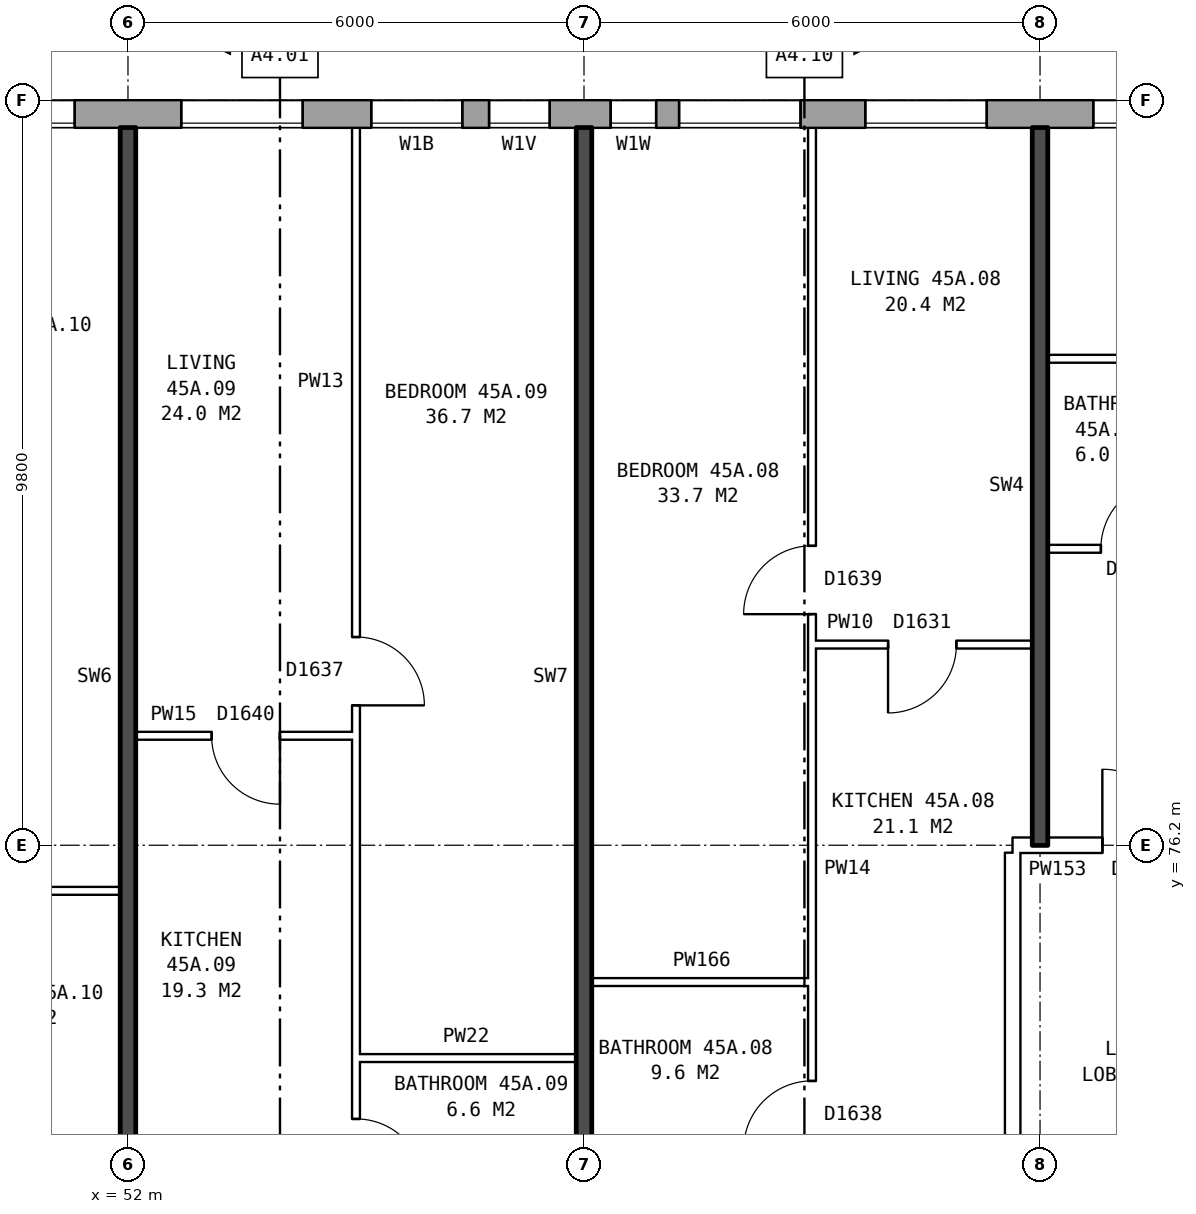
"""IFC4 building model, lengths in metres.
Left out: names, types, materials, properties, quantities, classifications, styles, units other than length and angle.
Written with IfcOpenShell. Run it as: python <this file> out.ifc"""

import sys

from ifc_helpers import new_model, si_unit, direction, frame, frame_2d, origin, place, context, subcontext, project, spatial, rectangle, extrude, element, fill, save


model = new_model("IFC4")
c1 = context("Model", 3, precision=1e-05, world=origin(), true_north=direction((0.0, 1.0)))
c2 = subcontext(c1, "Body", "Model", "MODEL_VIEW")
j1 = project(units=[si_unit("LENGTHUNIT", "METRE"), si_unit("PLANEANGLEUNIT", "RADIAN")], contexts=[c1])
p1 = place(None, origin())
s1 = spatial("IfcSite", under=j1, at=p1, CompositionType="ELEMENT")
p2 = place(p1, origin())
s2 = spatial("IfcBuilding", under=s1, at=p2, CompositionType="ELEMENT")
p3 = place(p2, frame((0.0, 0.0, 160.9)))
s3 = spatial("IfcBuildingStorey", under=s2, at=p3, CompositionType="ELEMENT", Elevation=160.9)
p4 = place(p3, frame((72.925, 85.82, 0.0), z_axis=(0.0, 0.0, 1.0), x_axis=(-1.0, 0.0, 0.0)))
e1 = element("IfcWall", 1, at=p4, inside=s3, PredefinedType="STANDARD", context=c2, shape_type="SweptSolid", body=[
    extrude(rectangle(XDim=41.351, YDim=0.36, at=frame_2d((20.675, 0.0))), origin(), (0.0, 0.0, 1.0), 2.85),
])
p5 = place(p4, frame((0.625, 0.0, 0.8)))
e2 = element("IfcOpeningElement", 2, at=p5, cuts=e1, PredefinedType="OPENING", context=c2, shape_type="SweptSolid", body=[
    extrude(rectangle(XDim=1.6, YDim=1.8, at=frame_2d((0.8, 0.9))), frame((0.0, 0.19, 0.0), z_axis=(0.0, -1.0, 0.0), x_axis=(1.0, 0.0, 0.0)), (0.0, 0.0, 1.0), 0.38),
])
p6 = place(p4, frame((3.625, 0.0, 0.8)))
e3 = element("IfcOpeningElement", 3, at=p6, cuts=e1, PredefinedType="OPENING", context=c2, shape_type="SweptSolid", body=[
    extrude(rectangle(XDim=1.6, YDim=1.8, at=frame_2d((0.8, 0.9))), frame((0.0, 0.19, 0.0), z_axis=(0.0, -1.0, 0.0), x_axis=(1.0, 0.0, 0.0)), (0.0, 0.0, 1.0), 0.38),
])
p7 = place(p4, frame((6.625, 0.0, 0.8)))
e4 = element("IfcOpeningElement", 4, at=p7, cuts=e1, PredefinedType="OPENING", context=c2, shape_type="SweptSolid", body=[
    extrude(rectangle(XDim=1.6, YDim=1.8, at=frame_2d((0.8, 0.9))), frame((0.0, 0.19, 0.0), z_axis=(0.0, -1.0, 0.0), x_axis=(1.0, 0.0, 0.0)), (0.0, 0.0, 1.0), 0.38),
])
p8 = place(p4, frame((9.625, 0.0, 0.8)))
e5 = element("IfcOpeningElement", 5, at=p8, cuts=e1, PredefinedType="OPENING", context=c2, shape_type="SweptSolid", body=[
    extrude(rectangle(XDim=1.6, YDim=1.8, at=frame_2d((0.8, 0.9))), frame((0.0, 0.19, 0.0), z_axis=(0.0, -1.0, 0.0), x_axis=(1.0, 0.0, 0.0)), (0.0, 0.0, 1.0), 0.38),
])
p9 = place(p4, frame((12.075, 0.0, 0.8)))
e6 = element("IfcOpeningElement", 6, at=p9, cuts=e1, PredefinedType="OPENING", context=c2, shape_type="SweptSolid", body=[
    extrude(rectangle(XDim=1.6, YDim=1.8, at=frame_2d((0.8, 0.9))), frame((0.0, 0.19, 0.0), z_axis=(0.0, -1.0, 0.0), x_axis=(1.0, 0.0, 0.0)), (0.0, 0.0, 1.0), 0.38),
])
p10 = place(p4, frame((15.375, 0.0, 0.25)))
e7 = element("IfcOpeningElement", 7, at=p10, cuts=e1, PredefinedType="OPENING", context=c2, shape_type="SweptSolid", body=[
    extrude(rectangle(XDim=0.8, YDim=0.9, at=frame_2d((0.4, 0.45))), frame((0.0, 0.19, 0.0), z_axis=(0.0, -1.0, 0.0), x_axis=(1.0, 0.0, 0.0)), (0.0, 0.0, 1.0), 0.38),
])
p11 = place(p4, frame((18.625, 0.0, 0.8)))
e8 = element("IfcOpeningElement", 8, at=p11, cuts=e1, PredefinedType="OPENING", context=c2, shape_type="SweptSolid", body=[
    extrude(rectangle(XDim=1.6, YDim=1.8, at=frame_2d((0.8, 0.9))), frame((0.0, 0.19, 0.0), z_axis=(0.0, -1.0, 0.0), x_axis=(1.0, 0.0, 0.0)), (0.0, 0.0, 1.0), 0.38),
])
p12 = place(p4, frame((21.625, 0.0, 0.8)))
e9 = element("IfcOpeningElement", 9, at=p12, cuts=e1, PredefinedType="OPENING", context=c2, shape_type="SweptSolid", body=[
    extrude(rectangle(XDim=1.6, YDim=1.8, at=frame_2d((0.8, 0.9))), frame((0.0, 0.19, 0.0), z_axis=(0.0, -1.0, 0.0), x_axis=(1.0, 0.0, 0.0)), (0.0, 0.0, 1.0), 0.38),
])
p13 = place(p4, frame((24.075, 0.0, 0.35)))
e10 = element("IfcOpeningElement", 10, at=p13, cuts=e1, PredefinedType="OPENING", context=c2, shape_type="SweptSolid", body=[
    extrude(rectangle(XDim=1.0, YDim=1.5, at=frame_2d((0.5, 0.75))), frame((0.0, 0.19, 0.0), z_axis=(0.0, -1.0, 0.0), x_axis=(1.0, 0.0, 0.0)), (0.0, 0.0, 1.0), 0.38),
])
p14 = place(p4, frame((27.625, 0.0, 0.8)))
e11 = element("IfcOpeningElement", 11, at=p14, cuts=e1, PredefinedType="OPENING", context=c2, shape_type="SweptSolid", body=[
    extrude(rectangle(XDim=1.6, YDim=1.8, at=frame_2d((0.8, 0.9))), frame((0.0, 0.19, 0.0), z_axis=(0.0, -1.0, 0.0), x_axis=(1.0, 0.0, 0.0)), (0.0, 0.0, 1.0), 0.38),
])
p15 = place(p4, frame((30.625, 0.0, 0.8)))
e12 = element("IfcOpeningElement", 12, at=p15, cuts=e1, PredefinedType="OPENING", context=c2, shape_type="SweptSolid", body=[
    extrude(rectangle(XDim=1.6, YDim=1.8, at=frame_2d((0.8, 0.9))), frame((0.0, 0.19, 0.0), z_axis=(0.0, -1.0, 0.0), x_axis=(1.0, 0.0, 0.0)), (0.0, 0.0, 1.0), 0.38),
])
p16 = place(p4, frame((33.625, 0.0, 0.8)))
e13 = element("IfcOpeningElement", 13, at=p16, cuts=e1, PredefinedType="OPENING", context=c2, shape_type="SweptSolid", body=[
    extrude(rectangle(XDim=1.6, YDim=1.8, at=frame_2d((0.8, 0.9))), frame((0.0, 0.19, 0.0), z_axis=(0.0, -1.0, 0.0), x_axis=(1.0, 0.0, 0.0)), (0.0, 0.0, 1.0), 0.38),
])
p17 = place(p4, frame((36.625, 0.0, 0.8)))
e14 = element("IfcOpeningElement", 14, at=p17, cuts=e1, PredefinedType="OPENING", context=c2, shape_type="SweptSolid", body=[
    extrude(rectangle(XDim=1.6, YDim=1.8, at=frame_2d((0.8, 0.9))), frame((0.0, 0.19, 0.0), z_axis=(0.0, -1.0, 0.0), x_axis=(1.0, 0.0, 0.0)), (0.0, 0.0, 1.0), 0.38),
])
p18 = place(p4, frame((13.975, 0.0, 1.5)))
e15 = element("IfcOpeningElement", 15, at=p18, cuts=e1, PredefinedType="OPENING", context=c2, shape_type="SweptSolid", body=[
    extrude(rectangle(XDim=0.6, YDim=0.9, at=frame_2d((0.3, 0.45))), frame((0.0, 0.19, 0.0), z_axis=(0.0, -1.0, 0.0), x_axis=(1.0, 0.0, 0.0)), (0.0, 0.0, 1.0), 0.38),
])
p19 = place(p4, frame((16.525, 0.0, 0.25)))
e16 = element("IfcOpeningElement", 16, at=p19, cuts=e1, PredefinedType="OPENING", context=c2, shape_type="SweptSolid", body=[
    extrude(rectangle(XDim=1.2, YDim=1.8, at=frame_2d((0.6, 0.9))), frame((0.0, 0.19, 0.0), z_axis=(0.0, -1.0, 0.0), x_axis=(1.0, 0.0, 0.0)), (0.0, 0.0, 1.0), 0.38),
])
p20 = place(p4, frame((25.375, 0.0, 0.25)))
e17 = element("IfcOpeningElement", 17, at=p20, cuts=e1, PredefinedType="OPENING", context=c2, shape_type="SweptSolid", body=[
    extrude(rectangle(XDim=0.6, YDim=0.9, at=frame_2d((0.3, 0.45))), frame((0.0, 0.19, 0.0), z_axis=(0.0, -1.0, 0.0), x_axis=(1.0, 0.0, 0.0)), (0.0, 0.0, 1.0), 0.38),
])
p21 = place(p3, frame((63.64, 63.9, 0.0), z_axis=(0.0, 0.0, 1.0), x_axis=(0.0, 1.0, 0.0)))
e18 = element("IfcWall", 18, at=p21, inside=s3, PredefinedType="PARTITIONING", context=c2, shape_type="SweptSolid", body=[
    extrude(rectangle(XDim=12.2, YDim=0.2, at=frame_2d((6.1, 0.0))), origin(), (0.0, 0.0, 1.0), 2.85),
])
p22 = place(p21, frame((5.1, 0.0, 0.0)))
e19 = element("IfcOpeningElement", 19, at=p22, cuts=e18, PredefinedType="OPENING", context=c2, shape_type="SweptSolid", body=[
    extrude(rectangle(XDim=2.0, YDim=2.1, at=frame_2d((1.0, 1.05))), frame((0.0, 0.11, 0.0), z_axis=(0.0, -1.0, 0.0), x_axis=(1.0, 0.0, 0.0)), (0.0, 0.0, 1.0), 0.22),
])
for number, where, z_axis, x_axis in (
    (20, (55.0, 73.4, 0.0), (0.0, 0.0, 1.0), (1.0, 0.0, 0.0)),
    (21, (58.1, 74.4, 0.0), (0.0, 0.0, 1.0), (1.0, 0.0, 0.0)),
    (22, (49.0, 75.6, 0.0), (0.0, 0.0, 1.0), (1.0, 0.0, 0.0)),
):
    element("IfcWall", number, at=place(p3, frame(where, z_axis=z_axis, x_axis=x_axis)), inside=s3, PredefinedType="PARTITIONING", context=c2, shape_type="SweptSolid", body=[
        extrude(rectangle(XDim=2.9, YDim=0.1, at=frame_2d((1.45, 0.0))), origin(), (0.0, 0.0, 1.0), 2.85),
    ])
p23 = place(p3, frame((63.64, 76.2, 0.0), z_axis=(0.0, 0.0, 1.0), x_axis=(1.0, 0.0, 0.0)))
e23 = element("IfcWall", 23, at=p23, inside=s3, PredefinedType="PARTITIONING", context=c2, shape_type="SweptSolid", body=[
    extrude(rectangle(XDim=3.0, YDim=0.2, at=frame_2d((1.5, 0.0))), origin(), (0.0, 0.0, 1.0), 2.85),
])
p24 = place(p23, frame((1.18, 0.0, 0.0)))
e24 = element("IfcOpeningElement", 24, at=p24, cuts=e23, PredefinedType="OPENING", context=c2, shape_type="SweptSolid", body=[
    extrude(rectangle(XDim=1.0, YDim=2.1, at=frame_2d((0.5, 1.05))), frame((0.0, 0.11, 0.0), z_axis=(0.0, -1.0, 0.0), x_axis=(1.0, 0.0, 0.0)), (0.0, 0.0, 1.0), 0.22),
])
p25 = place(p3, frame((52.1, 77.64, 0.0), z_axis=(0.0, 0.0, 1.0), x_axis=(1.0, 0.0, 0.0)))
e25 = element("IfcWall", 25, at=p25, inside=s3, PredefinedType="PARTITIONING", context=c2, shape_type="SweptSolid", body=[
    extrude(rectangle(XDim=2.9, YDim=0.1, at=frame_2d((1.45, 0.0))), origin(), (0.0, 0.0, 1.0), 2.85),
])
p26 = place(p25, frame((1.0, 0.0, 0.0)))
e26 = element("IfcOpeningElement", 26, at=p26, cuts=e25, PredefinedType="OPENING", context=c2, shape_type="SweptSolid", body=[
    extrude(rectangle(XDim=0.9, YDim=2.1, at=frame_2d((0.45, 1.05))), frame((0.0, 0.06, 0.0), z_axis=(0.0, -1.0, 0.0), x_axis=(1.0, 0.0, 0.0)), (0.0, 0.0, 1.0), 0.12),
])
p27 = place(p3, frame((61.0, 78.84, 0.0), z_axis=(0.0, 0.0, 1.0), x_axis=(1.0, 0.0, 0.0)))
e27 = element("IfcWall", 27, at=p27, inside=s3, PredefinedType="PARTITIONING", context=c2, shape_type="SweptSolid", body=[
    extrude(rectangle(XDim=2.9, YDim=0.1, at=frame_2d((1.45, 0.0))), origin(), (0.0, 0.0, 1.0), 2.85),
])
p28 = place(p27, frame((1.0, 0.0, 0.0)))
e28 = element("IfcOpeningElement", 28, at=p28, cuts=e27, PredefinedType="OPENING", context=c2, shape_type="SweptSolid", body=[
    extrude(rectangle(XDim=0.9, YDim=2.1, at=frame_2d((0.45, 1.05))), frame((0.0, 0.06, 0.0), z_axis=(0.0, -1.0, 0.0), x_axis=(1.0, 0.0, 0.0)), (0.0, 0.0, 1.0), 0.12),
])
p29 = place(p3, frame((64.1, 80.1, 0.0), z_axis=(0.0, 0.0, 1.0), x_axis=(1.0, 0.0, 0.0)))
e29 = element("IfcWall", 29, at=p29, inside=s3, PredefinedType="PARTITIONING", context=c2, shape_type="SweptSolid", body=[
    extrude(rectangle(XDim=5.8, YDim=0.1, at=frame_2d((2.9, 0.0))), origin(), (0.0, 0.0, 1.0), 2.85),
])
p30 = place(p29, frame((3.6, 0.0, 0.0)))
e30 = element("IfcOpeningElement", 30, at=p30, cuts=e29, PredefinedType="OPENING", context=c2, shape_type="SweptSolid", body=[
    extrude(rectangle(XDim=0.9, YDim=2.1, at=frame_2d((0.45, 1.05))), frame((0.0, 0.06, 0.0), z_axis=(0.0, -1.0, 0.0), x_axis=(1.0, 0.0, 0.0)), (0.0, 0.0, 1.0), 0.12),
])
p31 = place(p29, frame((0.7, 0.0, 0.0)))
e31 = element("IfcOpeningElement", 31, at=p31, cuts=e29, PredefinedType="OPENING", context=c2, shape_type="SweptSolid", body=[
    extrude(rectangle(XDim=0.9, YDim=2.1, at=frame_2d((0.45, 1.05))), frame((0.0, 0.06, 0.0), z_axis=(0.0, -1.0, 0.0), x_axis=(1.0, 0.0, 0.0)), (0.0, 0.0, 1.0), 0.12),
])
p32 = place(p3, frame((64.1, 82.6, 0.0), z_axis=(0.0, 0.0, 1.0), x_axis=(1.0, 0.0, 0.0)))
e32 = element("IfcWall", 32, at=p32, inside=s3, PredefinedType="PARTITIONING", context=c2, shape_type="SweptSolid", body=[
    extrude(rectangle(XDim=2.3, YDim=0.1, at=frame_2d((1.15, 0.0))), origin(), (0.0, 0.0, 1.0), 2.85),
])
p33 = place(p3, frame((52.0, 71.2, 0.0), z_axis=(0.0, 0.0, 1.0), x_axis=(0.0, 1.0, 0.0)))
e33 = element("IfcWall", 33, at=p33, inside=s3, PredefinedType="SOLIDWALL", context=c2, shape_type="SweptSolid", body=[
    extrude(rectangle(XDim=14.44, YDim=0.2, at=frame_2d((7.22, 0.0))), origin(), (0.0, 0.0, 1.0), 2.85),
])
p34 = place(p3, frame((55.0, 71.3, 0.0), z_axis=(0.0, 0.0, 1.0), x_axis=(0.0, 1.0, 0.0)))
e34 = element("IfcWall", 34, at=p34, inside=s3, PredefinedType="PARTITIONING", context=c2, shape_type="SweptSolid", body=[
    extrude(rectangle(XDim=14.34, YDim=0.1, at=frame_2d((7.17, 0.0))), origin(), (0.0, 0.0, 1.0), 2.85),
])
p35 = place(p34, frame((6.74, 0.0, 0.0)))
e35 = element("IfcOpeningElement", 35, at=p35, cuts=e34, PredefinedType="OPENING", context=c2, shape_type="SweptSolid", body=[
    extrude(rectangle(XDim=0.9, YDim=2.1, at=frame_2d((0.45, 1.05))), frame((0.0, 0.06, 0.0), z_axis=(0.0, -1.0, 0.0), x_axis=(1.0, 0.0, 0.0)), (0.0, 0.0, 1.0), 0.12),
])
p36 = place(p34, frame((0.4, 0.0, 0.0)))
e36 = element("IfcOpeningElement", 36, at=p36, cuts=e34, PredefinedType="OPENING", context=c2, shape_type="SweptSolid", body=[
    extrude(rectangle(XDim=0.9, YDim=2.1, at=frame_2d((0.45, 1.05))), frame((0.0, 0.06, 0.0), z_axis=(0.0, -1.0, 0.0), x_axis=(1.0, 0.0, 0.0)), (0.0, 0.0, 1.0), 0.12),
])
p37 = place(p3, frame((58.0, 71.2, 0.0), z_axis=(0.0, 0.0, 1.0), x_axis=(0.0, 1.0, 0.0)))
e37 = element("IfcWall", 37, at=p37, inside=s3, PredefinedType="SOLIDWALL", context=c2, shape_type="SweptSolid", body=[
    extrude(rectangle(XDim=14.44, YDim=0.2, at=frame_2d((7.22, 0.0))), origin(), (0.0, 0.0, 1.0), 2.85),
])
p38 = place(p3, frame((61.0, 71.3, 0.0), z_axis=(0.0, 0.0, 1.0), x_axis=(0.0, 1.0, 0.0)))
e38 = element("IfcWall", 38, at=p38, inside=s3, PredefinedType="PARTITIONING", context=c2, shape_type="SweptSolid", body=[
    extrude(rectangle(XDim=14.34, YDim=0.1, at=frame_2d((7.17, 0.0))), origin(), (0.0, 0.0, 1.0), 2.85),
])
p39 = place(p38, frame((7.94, 0.0, 0.0)))
e39 = element("IfcOpeningElement", 39, at=p39, cuts=e38, PredefinedType="OPENING", context=c2, shape_type="SweptSolid", body=[
    extrude(rectangle(XDim=0.9, YDim=2.1, at=frame_2d((0.45, 1.05))), frame((0.0, 0.06, 0.0), z_axis=(0.0, -1.0, 0.0), x_axis=(1.0, 0.0, 0.0)), (0.0, 0.0, 1.0), 0.12),
])
p40 = place(p38, frame((0.9, 0.0, 0.0)))
e40 = element("IfcOpeningElement", 40, at=p40, cuts=e38, PredefinedType="OPENING", context=c2, shape_type="SweptSolid", body=[
    extrude(rectangle(XDim=0.9, YDim=2.1, at=frame_2d((0.45, 1.05))), frame((0.0, 0.06, 0.0), z_axis=(0.0, -1.0, 0.0), x_axis=(1.0, 0.0, 0.0)), (0.0, 0.0, 1.0), 0.12),
])
p41 = place(p3, frame((64.0, 76.2, 0.0), z_axis=(0.0, 0.0, 1.0), x_axis=(0.0, 1.0, 0.0)))
e41 = element("IfcWall", 41, at=p41, inside=s3, PredefinedType="SOLIDWALL", context=c2, shape_type="SweptSolid", body=[
    extrude(rectangle(XDim=9.44, YDim=0.2, at=frame_2d((4.72, 0.0))), origin(), (0.0, 0.0, 1.0), 2.85),
])
p42 = place(p7, origin())
e42 = element("IfcWindow", 42, at=p42, inside=s3, PartitioningType="SINGLE_PANEL", PredefinedType="WINDOW", context=c2, shape_type="SweptSolid", body=[
    extrude(rectangle(XDim=1.6, YDim=1.8, at=frame_2d((0.8, 0.9))), frame((0.0, 0.15, 0.0), z_axis=(0.0, -1.0, 0.0), x_axis=(1.0, 0.0, 0.0)), (0.0, 0.0, 1.0), 0.06),
])
fill(e4, e42)
p43 = place(p8, origin())
e43 = element("IfcWindow", 43, at=p43, inside=s3, PartitioningType="SINGLE_PANEL", PredefinedType="WINDOW", context=c2, shape_type="SweptSolid", body=[
    extrude(rectangle(XDim=1.6, YDim=1.8, at=frame_2d((0.8, 0.9))), frame((0.0, 0.15, 0.0), z_axis=(0.0, -1.0, 0.0), x_axis=(1.0, 0.0, 0.0)), (0.0, 0.0, 1.0), 0.06),
])
fill(e5, e43)
p44 = place(p9, origin())
e44 = element("IfcWindow", 44, at=p44, inside=s3, PartitioningType="SINGLE_PANEL", PredefinedType="WINDOW", context=c2, shape_type="SweptSolid", body=[
    extrude(rectangle(XDim=1.6, YDim=1.8, at=frame_2d((0.8, 0.9))), frame((0.0, 0.15, 0.0), z_axis=(0.0, -1.0, 0.0), x_axis=(1.0, 0.0, 0.0)), (0.0, 0.0, 1.0), 0.06),
])
fill(e6, e44)
p45 = place(p10, origin())
e45 = element("IfcWindow", 45, at=p45, inside=s3, PartitioningType="SINGLE_PANEL", PredefinedType="WINDOW", context=c2, shape_type="SweptSolid", body=[
    extrude(rectangle(XDim=0.8, YDim=0.9, at=frame_2d((0.4, 0.45))), frame((0.0, 0.15, 0.0), z_axis=(0.0, -1.0, 0.0), x_axis=(1.0, 0.0, 0.0)), (0.0, 0.0, 1.0), 0.06),
])
fill(e7, e45)
p46 = place(p11, origin())
e46 = element("IfcWindow", 46, at=p46, inside=s3, PartitioningType="SINGLE_PANEL", PredefinedType="WINDOW", context=c2, shape_type="SweptSolid", body=[
    extrude(rectangle(XDim=1.6, YDim=1.8, at=frame_2d((0.8, 0.9))), frame((0.0, 0.15, 0.0), z_axis=(0.0, -1.0, 0.0), x_axis=(1.0, 0.0, 0.0)), (0.0, 0.0, 1.0), 0.06),
])
fill(e8, e46)
p47 = place(p12, origin())
e47 = element("IfcWindow", 47, at=p47, inside=s3, PartitioningType="SINGLE_PANEL", PredefinedType="WINDOW", context=c2, shape_type="SweptSolid", body=[
    extrude(rectangle(XDim=1.6, YDim=1.8, at=frame_2d((0.8, 0.9))), frame((0.0, 0.15, 0.0), z_axis=(0.0, -1.0, 0.0), x_axis=(1.0, 0.0, 0.0)), (0.0, 0.0, 1.0), 0.06),
])
fill(e9, e47)
p48 = place(p24, origin())
e48 = element("IfcDoor", 48, at=p48, inside=s3, OperationType="SINGLE_SWING_LEFT", PredefinedType="DOOR", context=c2, shape_type="SweptSolid", body=[
    extrude(rectangle(XDim=1.0, YDim=2.1, at=frame_2d((0.5, 1.05))), frame((0.0, 0.025, 0.0), z_axis=(0.0, -1.0, 0.0), x_axis=(1.0, 0.0, 0.0)), (0.0, 0.0, 1.0), 0.05),
])
fill(e24, e48)
p49 = place(p31, origin())
e49 = element("IfcDoor", 49, at=p49, inside=s3, OperationType="SINGLE_SWING_RIGHT", PredefinedType="DOOR", context=c2, shape_type="SweptSolid", body=[
    extrude(rectangle(XDim=0.9, YDim=2.1, at=frame_2d((0.45, 1.05))), frame((0.0, 0.025, 0.0), z_axis=(0.0, -1.0, 0.0), x_axis=(1.0, 0.0, 0.0)), (0.0, 0.0, 1.0), 0.05),
])
fill(e31, e49)
p50 = place(p39, origin())
e50 = element("IfcDoor", 50, at=p50, inside=s3, OperationType="SINGLE_SWING_LEFT", PredefinedType="DOOR", context=c2, shape_type="SweptSolid", body=[
    extrude(rectangle(XDim=0.9, YDim=2.1, at=frame_2d((0.45, 1.05))), frame((0.0, 0.025, 0.0), z_axis=(0.0, -1.0, 0.0), x_axis=(1.0, 0.0, 0.0)), (0.0, 0.0, 1.0), 0.05),
])
fill(e39, e50)
p51 = place(p28, frame((0.9, 0.0, 0.0), z_axis=(0.0, 0.0, 1.0), x_axis=(-1.0, 0.0, 0.0)))
e51 = element("IfcDoor", 51, at=p51, inside=s3, OperationType="SINGLE_SWING_RIGHT", PredefinedType="DOOR", context=c2, shape_type="SweptSolid", body=[
    extrude(rectangle(XDim=0.9, YDim=2.1, at=frame_2d((0.45, 1.05))), frame((0.0, 0.025, 0.0), z_axis=(0.0, -1.0, 0.0), x_axis=(1.0, 0.0, 0.0)), (0.0, 0.0, 1.0), 0.05),
])
fill(e28, e51)
p52 = place(p40, origin())
e52 = element("IfcDoor", 52, at=p52, inside=s3, OperationType="SINGLE_SWING_LEFT", PredefinedType="DOOR", context=c2, shape_type="SweptSolid", body=[
    extrude(rectangle(XDim=0.9, YDim=2.1, at=frame_2d((0.45, 1.05))), frame((0.0, 0.025, 0.0), z_axis=(0.0, -1.0, 0.0), x_axis=(1.0, 0.0, 0.0)), (0.0, 0.0, 1.0), 0.05),
])
fill(e40, e52)
p53 = place(p35, frame((0.9, 0.0, 0.0), z_axis=(0.0, 0.0, 1.0), x_axis=(-1.0, 0.0, 0.0)))
e53 = element("IfcDoor", 53, at=p53, inside=s3, OperationType="SINGLE_SWING_RIGHT", PredefinedType="DOOR", context=c2, shape_type="SweptSolid", body=[
    extrude(rectangle(XDim=0.9, YDim=2.1, at=frame_2d((0.45, 1.05))), frame((0.0, 0.025, 0.0), z_axis=(0.0, -1.0, 0.0), x_axis=(1.0, 0.0, 0.0)), (0.0, 0.0, 1.0), 0.05),
])
fill(e35, e53)
p54 = place(p26, frame((0.9, 0.0, 0.0), z_axis=(0.0, 0.0, 1.0), x_axis=(-1.0, 0.0, 0.0)))
e54 = element("IfcDoor", 54, at=p54, inside=s3, OperationType="SINGLE_SWING_LEFT", PredefinedType="DOOR", context=c2, shape_type="SweptSolid", body=[
    extrude(rectangle(XDim=0.9, YDim=2.1, at=frame_2d((0.45, 1.05))), frame((0.0, 0.025, 0.0), z_axis=(0.0, -1.0, 0.0), x_axis=(1.0, 0.0, 0.0)), (0.0, 0.0, 1.0), 0.05),
])
fill(e26, e54)
p55 = place(p36, frame((0.9, 0.0, 0.0), z_axis=(0.0, 0.0, 1.0), x_axis=(-1.0, 0.0, 0.0)))
e55 = element("IfcDoor", 55, at=p55, inside=s3, OperationType="SINGLE_SWING_RIGHT", PredefinedType="DOOR", context=c2, shape_type="SweptSolid", body=[
    extrude(rectangle(XDim=0.9, YDim=2.1, at=frame_2d((0.45, 1.05))), frame((0.0, 0.025, 0.0), z_axis=(0.0, -1.0, 0.0), x_axis=(1.0, 0.0, 0.0)), (0.0, 0.0, 1.0), 0.05),
])
fill(e36, e55)
p56 = place(p18, origin())
e56 = element("IfcWindow", 56, at=p56, inside=s3, PartitioningType="SINGLE_PANEL", PredefinedType="WINDOW", context=c2, shape_type="SweptSolid", body=[
    extrude(rectangle(XDim=0.6, YDim=0.9, at=frame_2d((0.3, 0.45))), frame((0.0, 0.15, 0.0), z_axis=(0.0, -1.0, 0.0), x_axis=(1.0, 0.0, 0.0)), (0.0, 0.0, 1.0), 0.06),
])
fill(e15, e56)
p57 = place(p19, origin())
e57 = element("IfcWindow", 57, at=p57, inside=s3, PartitioningType="SINGLE_PANEL", PredefinedType="WINDOW", context=c2, shape_type="SweptSolid", body=[
    extrude(rectangle(XDim=1.2, YDim=1.8, at=frame_2d((0.6, 0.9))), frame((0.0, 0.15, 0.0), z_axis=(0.0, -1.0, 0.0), x_axis=(1.0, 0.0, 0.0)), (0.0, 0.0, 1.0), 0.06),
])
fill(e16, e57)
save(model, sys.argv[1])
